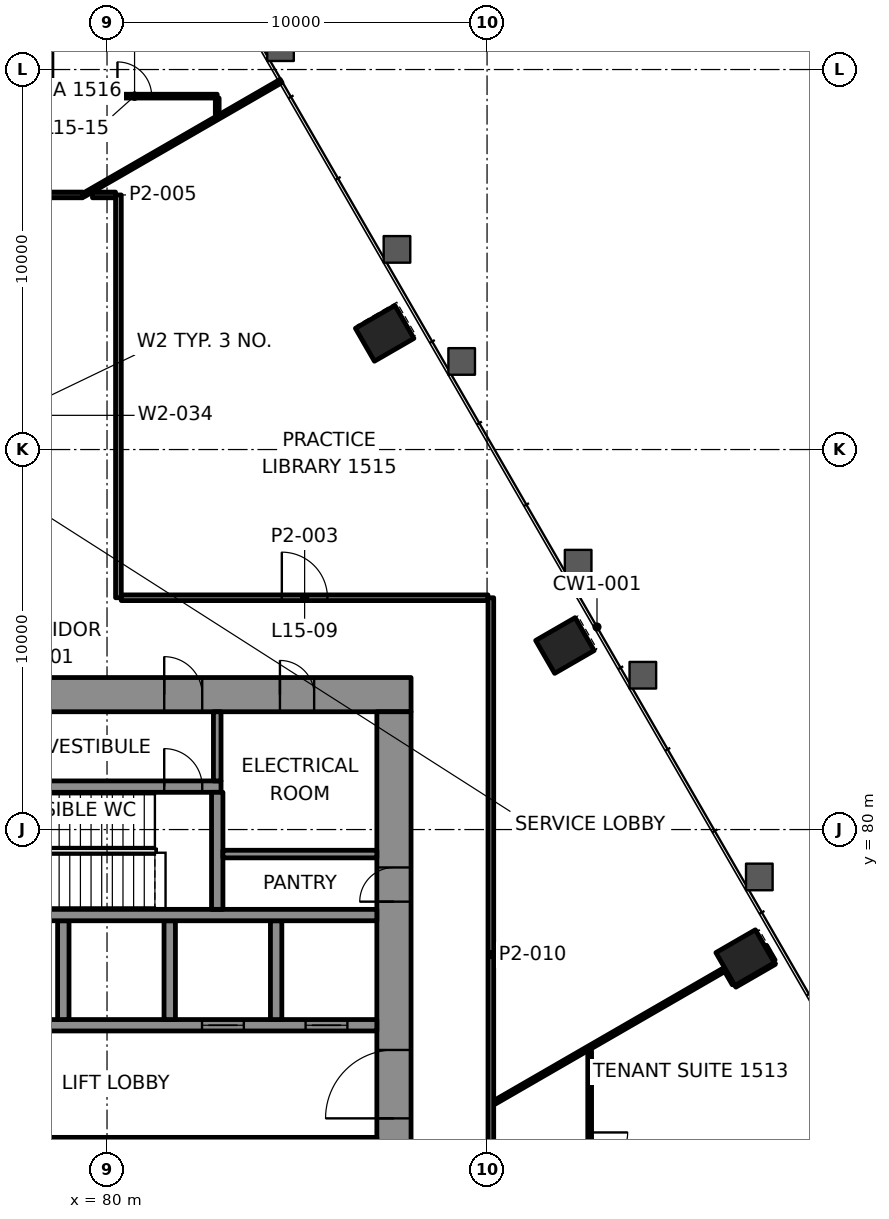
"""IFC4 building model, lengths in metres.
Left out: names, types, materials, properties, quantities, classifications, styles, units other than length and angle.
Written with IfcOpenShell. Run it as: python <this file> out.ifc"""

import sys

from ifc_helpers import new_model, si_unit, direction, frame, frame_2d, origin, origin_2d, place, context, subcontext, project, spatial, rectangle, extrude, element, fill, save


model = new_model("IFC4")
c1 = context("Model", 3, precision=1e-05, world=origin(), true_north=direction((0.0, 1.0)))
c2 = subcontext(c1, "Body", "Model", "MODEL_VIEW")
j1 = project(units=[si_unit("LENGTHUNIT", "METRE"), si_unit("PLANEANGLEUNIT", "RADIAN")], contexts=[c1])
p1 = place(None, origin())
s1 = spatial("IfcSite", under=j1, at=p1, CompositionType="ELEMENT")
p2 = place(p1, origin())
s2 = spatial("IfcBuilding", under=s1, at=p2, CompositionType="ELEMENT")
p3 = place(p2, frame((0.0, 0.0, 69.4)))
s3 = spatial("IfcBuildingStorey", under=s2, at=p3, CompositionType="ELEMENT", Elevation=69.4)
for number, where, z_axis, x_axis in (
    (1, (96.791, 76.628, -0.0), (0.0, 0.0, 1.0), (-0.5, 0.866, 0.0)),
    (2, (92.049, 84.843, -0.0), (0.0, 0.0, 1.0), (-0.5, 0.866, 0.0)),
    (3, (87.306, 93.057, -0.0), (0.0, 0.0, 1.0), (-0.5, 0.866, 0.0)),
):
    element("IfcColumn", number, at=place(p3, frame(where, z_axis=z_axis, x_axis=x_axis)), inside=s3, PredefinedType="COLUMN", context=c2, shape_type="SweptSolid", body=[
        extrude(rectangle(XDim=1.0, YDim=1.2, at=origin_2d()), origin(), (0.0, 0.0, 1.0), 4.2),
    ])
p4 = place(p3, frame((62.0, 83.55, 0.0), z_axis=(0.0, 0.0, 1.0), x_axis=(1.0, 0.0, 0.0)))
e4 = element("IfcWall", 4, at=p4, inside=s3, PredefinedType="SHEAR", context=c2, shape_type="SweptSolid", body=[
    extrude(rectangle(XDim=26.0, YDim=0.9, at=frame_2d((13.0, 0.0))), origin(), (0.0, 0.0, 1.0), 4.0),
])
p5 = place(p4, frame((5.695, 0.0, 0.0)))
e5 = element("IfcOpeningElement", 5, at=p5, cuts=e4, PredefinedType="OPENING", context=c2, shape_type="SweptSolid", body=[
    extrude(rectangle(XDim=1.0, YDim=2.1, at=frame_2d((0.5, 1.05))), frame((0.0, 0.46, 0.0), z_axis=(0.0, -1.0, 0.0), x_axis=(1.0, 0.0, 0.0)), (0.0, 0.0, 1.0), 0.92),
])
p6 = place(p4, frame((19.505, 0.0, 0.0)))
e6 = element("IfcOpeningElement", 6, at=p6, cuts=e4, PredefinedType="OPENING", context=c2, shape_type="SweptSolid", body=[
    extrude(rectangle(XDim=1.0, YDim=2.1, at=frame_2d((0.5, 1.05))), frame((0.0, 0.46, 0.0), z_axis=(0.0, -1.0, 0.0), x_axis=(1.0, 0.0, 0.0)), (0.0, 0.0, 1.0), 0.92),
])
p7 = place(p4, frame((3.45, 0.0, 0.0)))
e7 = element("IfcOpeningElement", 7, at=p7, cuts=e4, PredefinedType="OPENING", context=c2, shape_type="SweptSolid", body=[
    extrude(rectangle(XDim=0.9, YDim=2.1, at=frame_2d((0.45, 1.05))), frame((0.0, 0.46, 0.0), z_axis=(0.0, -1.0, 0.0), x_axis=(1.0, 0.0, 0.0)), (0.0, 0.0, 1.0), 0.92),
])
p8 = place(p4, frame((12.65, 0.0, 0.0)))
e8 = element("IfcOpeningElement", 8, at=p8, cuts=e4, PredefinedType="OPENING", context=c2, shape_type="SweptSolid", body=[
    extrude(rectangle(XDim=0.9, YDim=2.1, at=frame_2d((0.45, 1.05))), frame((0.0, 0.46, 0.0), z_axis=(0.0, -1.0, 0.0), x_axis=(1.0, 0.0, 0.0)), (0.0, 0.0, 1.0), 0.92),
])
p9 = place(p4, frame((22.55, 0.0, 0.0)))
e9 = element("IfcOpeningElement", 9, at=p9, cuts=e4, PredefinedType="OPENING", context=c2, shape_type="SweptSolid", body=[
    extrude(rectangle(XDim=0.9, YDim=2.1, at=frame_2d((0.45, 1.05))), frame((0.0, 0.46, 0.0), z_axis=(0.0, -1.0, 0.0), x_axis=(1.0, 0.0, 0.0)), (0.0, 0.0, 1.0), 0.92),
])
p10 = place(p3, frame((87.55, 66.9, 0.0), z_axis=(0.0, 0.0, 1.0), x_axis=(0.0, 1.0, 0.0)))
e10 = element("IfcWall", 10, at=p10, inside=s3, PredefinedType="SHEAR", context=c2, shape_type="SweptSolid", body=[
    extrude(rectangle(XDim=16.2, YDim=0.9, at=frame_2d((8.1, 0.0))), origin(), (0.0, 0.0, 1.0), 4.0),
])
p11 = place(p10, frame((5.5, 0.0, 0.0)))
e11 = element("IfcOpeningElement", 11, at=p11, cuts=e10, PredefinedType="OPENING", context=c2, shape_type="SweptSolid", body=[
    extrude(rectangle(XDim=1.8, YDim=2.1, at=frame_2d((0.9, 1.05))), frame((0.0, 0.46, 0.0), z_axis=(0.0, -1.0, 0.0), x_axis=(1.0, 0.0, 0.0)), (0.0, 0.0, 1.0), 0.92),
])
p12 = place(p10, frame((11.202, 0.0, 0.0)))
e12 = element("IfcOpeningElement", 12, at=p12, cuts=e10, PredefinedType="OPENING", context=c2, shape_type="SweptSolid", body=[
    extrude(rectangle(XDim=0.9, YDim=2.1, at=frame_2d((0.45, 1.05))), frame((0.0, 0.46, 0.0), z_axis=(0.0, -1.0, 0.0), x_axis=(1.0, 0.0, 0.0)), (0.0, 0.0, 1.0), 0.92),
])
p13 = place(p3, frame((70.3, 71.75, 0.0), z_axis=(0.0, 0.0, 1.0), x_axis=(1.0, 0.0, 0.0)))
e13 = element("IfcWall", 13, at=p13, inside=s3, PredefinedType="SHEAR", context=c2, shape_type="SweptSolid", body=[
    extrude(rectangle(XDim=16.8, YDim=0.3, at=frame_2d((8.4, 0.0))), origin(), (0.0, 0.0, 1.0), 4.0),
])
p14 = place(p13, frame((1.0, 0.0, 0.0)))
e14 = element("IfcOpeningElement", 14, at=p14, cuts=e13, PredefinedType="OPENING", context=c2, shape_type="SweptSolid", body=[
    extrude(rectangle(XDim=1.1, YDim=2.1, at=frame_2d((0.55, 1.05))), frame((0.0, 0.16, 0.0), z_axis=(0.0, -1.0, 0.0), x_axis=(1.0, 0.0, 0.0)), (0.0, 0.0, 1.0), 0.32),
])
p15 = place(p13, frame((3.8, 0.0, 0.0)))
e15 = element("IfcOpeningElement", 15, at=p15, cuts=e13, PredefinedType="OPENING", context=c2, shape_type="SweptSolid", body=[
    extrude(rectangle(XDim=1.1, YDim=2.1, at=frame_2d((0.55, 1.05))), frame((0.0, 0.16, 0.0), z_axis=(0.0, -1.0, 0.0), x_axis=(1.0, 0.0, 0.0)), (0.0, 0.0, 1.0), 0.32),
])
p16 = place(p13, frame((6.6, 0.0, 0.0)))
e16 = element("IfcOpeningElement", 16, at=p16, cuts=e13, PredefinedType="OPENING", context=c2, shape_type="SweptSolid", body=[
    extrude(rectangle(XDim=1.1, YDim=2.1, at=frame_2d((0.55, 1.05))), frame((0.0, 0.16, 0.0), z_axis=(0.0, -1.0, 0.0), x_axis=(1.0, 0.0, 0.0)), (0.0, 0.0, 1.0), 0.32),
])
p17 = place(p13, frame((9.4, 0.0, 0.0)))
e17 = element("IfcOpeningElement", 17, at=p17, cuts=e13, PredefinedType="OPENING", context=c2, shape_type="SweptSolid", body=[
    extrude(rectangle(XDim=1.1, YDim=2.1, at=frame_2d((0.55, 1.05))), frame((0.0, 0.16, 0.0), z_axis=(0.0, -1.0, 0.0), x_axis=(1.0, 0.0, 0.0)), (0.0, 0.0, 1.0), 0.32),
])
p18 = place(p13, frame((12.2, 0.0, 0.0)))
e18 = element("IfcOpeningElement", 18, at=p18, cuts=e13, PredefinedType="OPENING", context=c2, shape_type="SweptSolid", body=[
    extrude(rectangle(XDim=1.1, YDim=2.1, at=frame_2d((0.55, 1.05))), frame((0.0, 0.16, 0.0), z_axis=(0.0, -1.0, 0.0), x_axis=(1.0, 0.0, 0.0)), (0.0, 0.0, 1.0), 0.32),
])
p19 = place(p13, frame((14.925, 0.0, 0.0)))
e19 = element("IfcOpeningElement", 19, at=p19, cuts=e13, PredefinedType="OPENING", context=c2, shape_type="SweptSolid", body=[
    extrude(rectangle(XDim=1.1, YDim=2.1, at=frame_2d((0.55, 1.05))), frame((0.0, 0.16, 0.0), z_axis=(0.0, -1.0, 0.0), x_axis=(1.0, 0.0, 0.0)), (0.0, 0.0, 1.0), 0.32),
])
p20 = place(p3, frame((70.3, 74.85, 0.0), z_axis=(0.0, 0.0, 1.0), x_axis=(1.0, 0.0, 0.0)))
e20 = element("IfcWall", 20, at=p20, inside=s3, PredefinedType="SHEAR", context=c2, shape_type="SweptSolid", body=[
    extrude(rectangle(XDim=16.8, YDim=0.3, at=frame_2d((8.4, 0.0))), origin(), (0.0, 0.0, 1.0), 4.0),
])
p21 = place(p20, frame((3.8, 0.0, 0.0)))
e21 = element("IfcOpeningElement", 21, at=p21, cuts=e20, PredefinedType="OPENING", context=c2, shape_type="SweptSolid", body=[
    extrude(rectangle(XDim=1.1, YDim=2.1, at=frame_2d((0.55, 1.05))), frame((0.0, 0.16, 0.0), z_axis=(0.0, -1.0, 0.0), x_axis=(1.0, 0.0, 0.0)), (0.0, 0.0, 1.0), 0.32),
])
p22 = place(p20, frame((12.2, 0.0, 0.0)))
e22 = element("IfcOpeningElement", 22, at=p22, cuts=e20, PredefinedType="OPENING", context=c2, shape_type="SweptSolid", body=[
    extrude(rectangle(XDim=1.1, YDim=2.1, at=frame_2d((0.55, 1.05))), frame((0.0, 0.16, 0.0), z_axis=(0.0, -1.0, 0.0), x_axis=(1.0, 0.0, 0.0)), (0.0, 0.0, 1.0), 0.32),
])
p23 = place(p20, frame((14.925, 0.0, 0.0)))
e23 = element("IfcOpeningElement", 23, at=p23, cuts=e20, PredefinedType="OPENING", context=c2, shape_type="SweptSolid", body=[
    extrude(rectangle(XDim=1.1, YDim=2.1, at=frame_2d((0.55, 1.05))), frame((0.0, 0.16, 0.0), z_axis=(0.0, -1.0, 0.0), x_axis=(1.0, 0.0, 0.0)), (0.0, 0.0, 1.0), 0.32),
])
for number, where, z_axis, x_axis in (
    (24, (78.85, 75.0, 0.0), (0.0, 0.0, 1.0), (0.0, 1.0, 0.0)),
    (25, (81.65, 75.0, 0.0), (0.0, 0.0, 1.0), (0.0, 1.0, 0.0)),
    (26, (84.45, 75.0, 0.0), (0.0, 0.0, 1.0), (0.0, 1.0, 0.0)),
):
    element("IfcWall", number, at=place(p3, frame(where, z_axis=z_axis, x_axis=x_axis)), inside=s3, PredefinedType="SHEAR", context=c2, shape_type="SweptSolid", body=[
        extrude(rectangle(XDim=2.6, YDim=0.3, at=frame_2d((1.3, 0.0))), origin(), (0.0, 0.0, 1.0), 4.0),
    ])
p24 = place(p3, frame((64.35, 77.75, 0.0), z_axis=(0.0, 0.0, 1.0), x_axis=(1.0, 0.0, 0.0)))
e27 = element("IfcWall", 27, at=p24, inside=s3, PredefinedType="SHEAR", context=c2, shape_type="SweptSolid", body=[
    extrude(rectangle(XDim=22.75, YDim=0.3, at=frame_2d((11.375, 0.0))), origin(), (0.0, 0.0, 1.0), 4.0),
])
p25 = place(p24, frame((3.345, 0.0, 0.0)))
e28 = element("IfcOpeningElement", 28, at=p25, cuts=e27, PredefinedType="OPENING", context=c2, shape_type="SweptSolid", body=[
    extrude(rectangle(XDim=1.0, YDim=2.1, at=frame_2d((0.5, 1.05))), frame((0.0, 0.16, 0.0), z_axis=(0.0, -1.0, 0.0), x_axis=(1.0, 0.0, 0.0)), (0.0, 0.0, 1.0), 0.32),
])
p26 = place(p3, frame((76.14, 81.13, 0.0), z_axis=(0.0, 0.0, 1.0), x_axis=(1.0, 0.0, 0.0)))
e29 = element("IfcWall", 29, at=p26, inside=s3, PredefinedType="SHEAR", context=c2, shape_type="SweptSolid", body=[
    extrude(rectangle(XDim=6.86, YDim=0.3, at=frame_2d((3.43, 0.0))), origin(), (0.0, 0.0, 1.0), 4.0),
])
p27 = place(p26, frame((5.365, 0.0, 0.0)))
e30 = element("IfcOpeningElement", 30, at=p27, cuts=e29, PredefinedType="OPENING", context=c2, shape_type="SweptSolid", body=[
    extrude(rectangle(XDim=1.0, YDim=2.1, at=frame_2d((0.5, 1.05))), frame((0.0, 0.16, 0.0), z_axis=(0.0, -1.0, 0.0), x_axis=(1.0, 0.0, 0.0)), (0.0, 0.0, 1.0), 0.32),
])
p28 = place(p3, frame((82.9, 77.9, 0.0), z_axis=(0.0, 0.0, 1.0), x_axis=(0.0, 1.0, 0.0)))
e31 = element("IfcWall", 31, at=p28, inside=s3, PredefinedType="SHEAR", context=c2, shape_type="SweptSolid", body=[
    extrude(rectangle(XDim=3.08, YDim=0.3, at=frame_2d((1.54, 0.0))), origin(), (0.0, 0.0, 1.0), 4.0),
])
p29 = place(p3, frame((80.375, 86.1, 0.0), z_axis=(0.0, 0.0, 1.0), x_axis=(1.0, 0.0, 0.0)))
e32 = element("IfcWall", 32, at=p29, inside=s3, PredefinedType="PARTITIONING", context=c2, shape_type="SweptSolid", body=[
    extrude(rectangle(XDim=9.649, YDim=0.15, at=frame_2d((4.825, 0.0))), origin(), (0.0, 0.0, 1.0), 3.4),
])
p30 = place(p29, frame((4.225, 0.0, 0.0)))
e33 = element("IfcOpeningElement", 33, at=p30, cuts=e32, PredefinedType="OPENING", context=c2, shape_type="SweptSolid", body=[
    extrude(rectangle(XDim=1.2, YDim=2.1, at=frame_2d((0.6, 1.05))), frame((0.0, 0.085, 0.0), z_axis=(0.0, -1.0, 0.0), x_axis=(1.0, 0.0, 0.0)), (0.0, 0.0, 1.0), 0.17),
])
p31 = place(p3, frame((75.975, 96.7, 0.0), z_axis=(0.0, 0.0, 1.0), x_axis=(1.0, 0.0, 0.0)))
e34 = element("IfcWall", 34, at=p31, inside=s3, PredefinedType="PARTITIONING", context=c2, shape_type="SweptSolid", body=[
    extrude(rectangle(XDim=3.387, YDim=0.15, at=frame_2d((1.693, 0.0))), origin(), (0.0, 0.0, 1.0), 3.4),
])
p32 = place(p31, frame((1.194, 0.0, 0.0)))
e35 = element("IfcOpeningElement", 35, at=p32, cuts=e34, PredefinedType="OPENING", context=c2, shape_type="SweptSolid", body=[
    extrude(rectangle(XDim=1.0, YDim=2.1, at=frame_2d((0.5, 1.05))), frame((0.0, 0.085, 0.0), z_axis=(0.0, -1.0, 0.0), x_axis=(1.0, 0.0, 0.0)), (0.0, 0.0, 1.0), 0.17),
])
p33 = place(p3, frame((78.55, 99.3, 0.0), z_axis=(0.0, 0.0, 1.0), x_axis=(1.0, 0.0, 0.0)))
e36 = element("IfcWall", 36, at=p33, inside=s3, PredefinedType="PARTITIONING", context=c2, shape_type="SweptSolid", body=[
    extrude(rectangle(XDim=4.349, YDim=0.1, at=frame_2d((2.175, 0.0))), origin(), (0.0, 0.0, 1.0), 3.4),
])
p34 = place(p33, frame((1.725, 0.0, 0.0)))
e37 = element("IfcOpeningElement", 37, at=p34, cuts=e36, PredefinedType="OPENING", context=c2, shape_type="SweptSolid", body=[
    extrude(rectangle(XDim=0.9, YDim=2.1, at=frame_2d((0.45, 1.05))), frame((0.0, 0.06, 0.0), z_axis=(0.0, -1.0, 0.0), x_axis=(1.0, 0.0, 0.0)), (0.0, 0.0, 1.0), 0.12),
])
p35 = place(p3, frame((96.522, 75.896, 0.0), z_axis=(0.0, 0.0, 1.0), x_axis=(0.865978732077, 0.500080829057, 0.0)))
e38 = element("IfcWall", 38, at=p35, inside=s3, PredefinedType="PARTITIONING", context=c2, shape_type="SweptSolid", body=[
    extrude(rectangle(XDim=1.199, YDim=0.1, at=frame_2d((0.6, 0.0))), origin(), (0.0, 0.0, 1.0), 3.165),
])
p36 = place(p3, frame((90.201, 72.824, 0.0), z_axis=(0.0, 0.0, 1.0), x_axis=(0.866028979627, 0.499993806408, 0.0)))
e39 = element("IfcWall", 39, at=p36, inside=s3, PredefinedType="PARTITIONING", context=c2, shape_type="SweptSolid", body=[
    extrude(rectangle(XDim=7.009, YDim=0.1, at=frame_2d((3.505, 0.0))), origin(), (0.0, 0.0, 1.0), 3.4),
])
p37 = place(p3, frame((79.387, 96.7, 0.0), z_axis=(0.0, 0.0, 1.0), x_axis=(0.866032365835, 0.499987941182, 0.0)))
e40 = element("IfcWall", 40, at=p37, inside=s3, PredefinedType="PARTITIONING", context=c2, shape_type="SweptSolid", body=[
    extrude(rectangle(XDim=5.997, YDim=0.1, at=frame_2d((2.999, 0.0))), origin(), (0.0, 0.0, 1.0), 3.165),
])
p38 = place(p3, frame((92.7, 74.179, 0.0), z_axis=(0.0, 0.0, 1.0), x_axis=(0.0, -1.0, 0.0)))
e41 = element("IfcWall", 41, at=p38, inside=s3, PredefinedType="PARTITIONING", context=c2, shape_type="SweptSolid", body=[
    extrude(rectangle(XDim=5.299, YDim=0.1, at=frame_2d((2.649, 0.0))), origin(), (0.0, 0.0, 1.0), 3.4),
])
p39 = place(p38, frame((2.149, 0.0, 0.0)))
e42 = element("IfcOpeningElement", 42, at=p39, cuts=e41, PredefinedType="OPENING", context=c2, shape_type="SweptSolid", body=[
    extrude(rectangle(XDim=1.0, YDim=2.1, at=frame_2d((0.5, 1.05))), frame((0.0, 0.06, 0.0), z_axis=(0.0, -1.0, 0.0), x_axis=(1.0, 0.0, 0.0)), (0.0, 0.0, 1.0), 0.12),
])
p40 = place(p3, frame((90.1, 86.099, 0.0), z_axis=(0.0, 0.0, 1.0), x_axis=(0.0, -1.0, 0.0)))
e43 = element("IfcWall", 43, at=p40, inside=s3, PredefinedType="PARTITIONING", context=c2, shape_type="SweptSolid", body=[
    extrude(rectangle(XDim=18.778, YDim=0.15, at=frame_2d((9.389, 0.0))), origin(), (0.0, 0.0, 1.0), 3.4),
])
p41 = place(p40, frame((15.455, 0.0, 0.0)))
e44 = element("IfcOpeningElement", 44, at=p41, cuts=e43, PredefinedType="OPENING", context=c2, shape_type="SweptSolid", body=[
    extrude(rectangle(XDim=1.0, YDim=2.1, at=frame_2d((0.5, 1.05))), frame((0.0, 0.085, 0.0), z_axis=(0.0, -1.0, 0.0), x_axis=(1.0, 0.0, 0.0)), (0.0, 0.0, 1.0), 0.17),
])
p42 = place(p3, frame((82.9, 98.816, 0.0), z_axis=(0.0, 0.0, 1.0), x_axis=(0.0, 1.0, 0.0)))
e45 = element("IfcWall", 45, at=p42, inside=s3, PredefinedType="PARTITIONING", context=c2, shape_type="SweptSolid", body=[
    extrude(rectangle(XDim=0.433, YDim=0.1, at=frame_2d((0.217, 0.0))), origin(), (0.0, 0.0, 1.0), 3.4),
])
p43 = place(p3, frame((80.3, 86.1, 0.0), z_axis=(0.0, 0.0, 1.0), x_axis=(0.0, 1.0, 0.0)))
e46 = element("IfcWall", 46, at=p43, inside=s3, PredefinedType="PARTITIONING", context=c2, shape_type="SweptSolid", body=[
    extrude(rectangle(XDim=10.599, YDim=0.15, at=frame_2d((5.3, 0.0))), origin(), (0.0, 0.0, 1.0), 3.4),
])
p44 = place(p3, frame((97.536, 76.539, 0.0), z_axis=(0.0, 0.0, 1.0), x_axis=(-0.499879237999, 0.866095114533, 0.0)))
e47 = element("IfcWall", 47, at=p44, inside=s3, PredefinedType="PARTITIONING", context=c2, shape_type="SweptSolid", body=[
    extrude(rectangle(XDim=0.449, YDim=0.1, at=frame_2d((0.225, 0.0))), origin(), (0.0, 0.0, 1.0), 3.4),
])
p45 = place(p3, frame((96.496, 75.939, 0.0), z_axis=(0.0, 0.0, 1.0), x_axis=(-0.499757756434, 0.866165218006, 0.0)))
e48 = element("IfcWall", 48, at=p45, inside=s3, PredefinedType="PARTITIONING", context=c2, shape_type="SweptSolid", body=[
    extrude(rectangle(XDim=0.399, YDim=0.1, at=frame_2d((0.2, 0.0))), origin(), (0.0, 0.0, 1.0), 3.4),
])
p46 = place(p3, frame((79.617, 96.7, 0.0), z_axis=(0.0, 0.0, 1.0), x_axis=(1.0, 0.0, 0.0)))
e49 = element("IfcWall", 49, at=p46, inside=s3, PredefinedType="PARTITIONING", context=c2, shape_type="SweptSolid", body=[
    extrude(rectangle(XDim=0.607, YDim=0.15, at=frame_2d((0.304, 0.0))), origin(), (0.0, 0.0, 1.0), 3.4),
])
p47 = place(p3, frame((83.05, 79.355, 0.0), z_axis=(0.0, 0.0, 1.0), x_axis=(1.0, 0.0, 0.0)))
e50 = element("IfcWall", 50, at=p47, inside=s3, PredefinedType="PARTITIONING", context=c2, shape_type="SweptSolid", body=[
    extrude(rectangle(XDim=4.05, YDim=0.2, at=frame_2d((2.025, 0.0))), origin(), (0.0, 0.0, 1.0), 4.0),
])
p48 = place(p3, frame((82.9, 81.28, 0.0), z_axis=(0.0, 0.0, 1.0), x_axis=(0.0, 1.0, 0.0)))
e51 = element("IfcWall", 51, at=p48, inside=s3, PredefinedType="PARTITIONING", context=c2, shape_type="SweptSolid", body=[
    extrude(rectangle(XDim=1.82, YDim=0.2, at=frame_2d((0.91, 0.0))), origin(), (0.0, 0.0, 1.0), 4.0),
])
p49 = place(p30, origin())
e52 = element("IfcDoor", 52, at=p49, inside=s3, OperationType="DOUBLE_DOOR_SINGLE_SWING", PredefinedType="DOOR", context=c2, shape_type="SweptSolid", body=[
    extrude(rectangle(XDim=1.2, YDim=2.1, at=frame_2d((0.6, 1.05))), frame((0.0, 0.025, 0.0), z_axis=(0.0, -1.0, 0.0), x_axis=(1.0, 0.0, 0.0)), (0.0, 0.0, 1.0), 0.05),
])
fill(e33, e52)
p50 = place(p34, origin())
e53 = element("IfcDoor", 53, at=p50, inside=s3, OperationType="SINGLE_SWING_RIGHT", PredefinedType="DOOR", context=c2, shape_type="SweptSolid", body=[
    extrude(rectangle(XDim=0.9, YDim=2.1, at=frame_2d((0.45, 1.05))), frame((0.0, 0.025, 0.0), z_axis=(0.0, -1.0, 0.0), x_axis=(1.0, 0.0, 0.0)), (0.0, 0.0, 1.0), 0.05),
])
fill(e37, e53)
p51 = place(p39, origin())
e54 = element("IfcDoor", 54, at=p51, inside=s3, OperationType="SINGLE_SWING_LEFT", PredefinedType="DOOR", context=c2, shape_type="SweptSolid", body=[
    extrude(rectangle(XDim=1.0, YDim=2.1, at=frame_2d((0.5, 1.05))), frame((0.0, 0.025, 0.0), z_axis=(0.0, -1.0, 0.0), x_axis=(1.0, 0.0, 0.0)), (0.0, 0.0, 1.0), 0.05),
])
fill(e42, e54)
p52 = place(p22, origin())
e55 = element("IfcDoor", 55, at=p52, inside=s3, OperationType="DOUBLE_DOOR_SLIDING", PredefinedType="DOOR", context=c2, shape_type="SweptSolid", body=[
    extrude(rectangle(XDim=1.1, YDim=2.1, at=frame_2d((0.55, 1.05))), frame((0.0, 0.025, 0.0), z_axis=(0.0, -1.0, 0.0), x_axis=(1.0, 0.0, 0.0)), (0.0, 0.0, 1.0), 0.05),
])
fill(e22, e55)
p53 = place(p23, origin())
e56 = element("IfcDoor", 56, at=p53, inside=s3, OperationType="DOUBLE_DOOR_SLIDING", PredefinedType="DOOR", context=c2, shape_type="SweptSolid", body=[
    extrude(rectangle(XDim=1.1, YDim=2.1, at=frame_2d((0.55, 1.05))), frame((0.0, 0.025, 0.0), z_axis=(0.0, -1.0, 0.0), x_axis=(1.0, 0.0, 0.0)), (0.0, 0.0, 1.0), 0.05),
])
fill(e23, e56)
p54 = place(p27, origin())
e57 = element("IfcDoor", 57, at=p54, inside=s3, OperationType="SINGLE_SWING_RIGHT", PredefinedType="DOOR", context=c2, shape_type="SweptSolid", body=[
    extrude(rectangle(XDim=1.0, YDim=2.1, at=frame_2d((0.5, 1.05))), frame((0.0, 0.025, 0.0), z_axis=(0.0, -1.0, 0.0), x_axis=(1.0, 0.0, 0.0)), (0.0, 0.0, 1.0), 0.05),
])
fill(e30, e57)
p55 = place(p6, origin())
e58 = element("IfcDoor", 58, at=p55, inside=s3, OperationType="SINGLE_SWING_LEFT", PredefinedType="DOOR", context=c2, shape_type="SweptSolid", body=[
    extrude(rectangle(XDim=1.0, YDim=2.1, at=frame_2d((0.5, 1.05))), frame((0.0, 0.17, 0.0), z_axis=(0.0, -1.0, 0.0), x_axis=(1.0, 0.0, 0.0)), (0.0, 0.0, 1.0), 0.34),
])
fill(e6, e58)
p56 = place(p11, origin())
e59 = element("IfcDoor", 59, at=p56, inside=s3, OperationType="SINGLE_SWING_RIGHT", PredefinedType="DOOR", context=c2, shape_type="SweptSolid", body=[
    extrude(rectangle(XDim=1.8, YDim=2.1, at=frame_2d((0.9, 1.05))), frame((0.0, 0.17, 0.0), z_axis=(0.0, -1.0, 0.0), x_axis=(1.0, 0.0, 0.0)), (0.0, 0.0, 1.0), 0.34),
])
fill(e11, e59)
p57 = place(p12, origin())
e60 = element("IfcDoor", 60, at=p57, inside=s3, OperationType="SINGLE_SWING_RIGHT", PredefinedType="DOOR", context=c2, shape_type="SweptSolid", body=[
    extrude(rectangle(XDim=0.9, YDim=2.1, at=frame_2d((0.45, 1.05))), frame((0.0, 0.17, 0.0), z_axis=(0.0, -1.0, 0.0), x_axis=(1.0, 0.0, 0.0)), (0.0, 0.0, 1.0), 0.34),
])
fill(e12, e60)
p58 = place(p9, origin())
e61 = element("IfcDoor", 61, at=p58, inside=s3, OperationType="SINGLE_SWING_LEFT", PredefinedType="DOOR", context=c2, shape_type="SweptSolid", body=[
    extrude(rectangle(XDim=0.9, YDim=2.1, at=frame_2d((0.45, 1.05))), frame((0.0, 0.17, 0.0), z_axis=(0.0, -1.0, 0.0), x_axis=(1.0, 0.0, 0.0)), (0.0, 0.0, 1.0), 0.34),
])
fill(e9, e61)
save(model, sys.argv[1])
